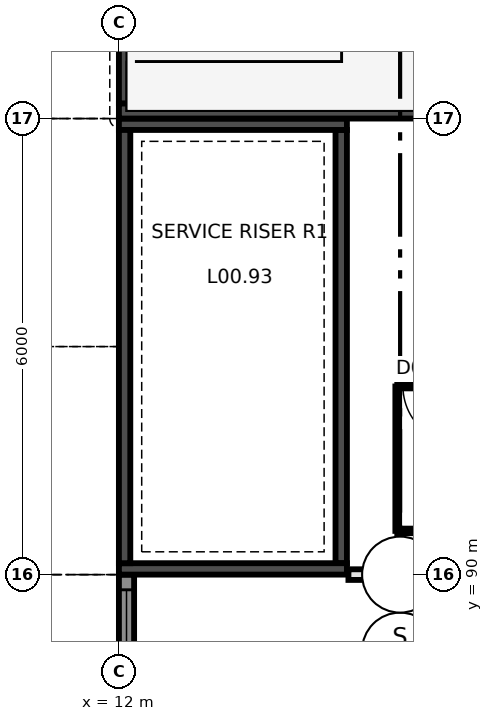
"""IFC4 building model, lengths in metres.
Left out: names, types, materials, properties, quantities, classifications, styles, units other than length and angle.
Written with IfcOpenShell. Run it as: python <this file> out.ifc"""

import sys

from ifc_helpers import new_model, si_unit, direction, frame, frame_2d, origin, place, context, subcontext, project, spatial, rectangle, extrude, element, fill, save


model = new_model("IFC4")
c1 = context("Model", 3, precision=1e-05, world=origin(), true_north=direction((0.0, 1.0)))
c2 = subcontext(c1, "Body", "Model", "MODEL_VIEW")
j1 = project(units=[si_unit("LENGTHUNIT", "METRE"), si_unit("PLANEANGLEUNIT", "RADIAN")], contexts=[c1])
p1 = place(None, origin())
s1 = spatial("IfcSite", under=j1, at=p1, CompositionType="ELEMENT")
p2 = place(p1, origin())
s2 = spatial("IfcBuilding", under=s1, at=p2, CompositionType="ELEMENT")
p3 = place(p2, origin())
s3 = spatial("IfcBuildingStorey", under=s2, at=p3, CompositionType="ELEMENT", Elevation=0.0)
p4 = place(p3, frame((12.0, 96.1, -0.3), z_axis=(0.0, 0.0, 1.0), x_axis=(1.0, 0.0, 0.0)))
e1 = element("IfcWall", 1, at=p4, inside=s3, PredefinedType="SHEAR", context=c2, shape_type="SweptSolid", body=[
    extrude(rectangle(XDim=6.0, YDim=0.2, at=frame_2d((3.0, 0.0))), origin(), (0.0, 0.0, 1.0), 7.3),
])
p5 = place(p3, frame((12.1, 96.2, -0.3), z_axis=(0.0, 0.0, 1.0), x_axis=(0.0, 1.0, 0.0)))
e2 = element("IfcWall", 2, at=p5, inside=s3, PredefinedType="SHEAR", context=c2, shape_type="SweptSolid", body=[
    extrude(rectangle(XDim=5.6, YDim=0.2, at=frame_2d((2.8, 0.0))), origin(), (0.0, 0.0, 1.0), 7.3),
])
p6 = place(p5, frame((3.675, 0.0, 0.3)))
e3 = element("IfcOpeningElement", 3, at=p6, cuts=e2, PredefinedType="OPENING", context=c2, shape_type="SweptSolid", body=[
    extrude(rectangle(XDim=1.8, YDim=2.4, at=frame_2d((0.9, 1.2))), frame((0.0, 0.11, 0.0), z_axis=(0.0, -1.0, 0.0), x_axis=(1.0, 0.0, 0.0)), (0.0, 0.0, 1.0), 0.22),
])
for number, where, z_axis, x_axis in (
    (4, (12.0, 95.925, -0.3), (0.0, 0.0, 1.0), (1.0, 0.0, 0.0)),
    (5, (12.0, 90.075, -0.3), (0.0, 0.0, 1.0), (1.0, 0.0, 0.0)),
):
    element("IfcWall", number, at=place(p3, frame(where, z_axis=z_axis, x_axis=x_axis)), inside=s3, PredefinedType="SHEAR", context=c2, shape_type="SweptSolid", body=[
        extrude(rectangle(XDim=3.0, YDim=0.15, at=frame_2d((1.5, 0.0))), origin(), (0.0, 0.0, 1.0), 7.3),
    ])
for number, where, z_axis, x_axis in (
    (6, (12.075, 90.15, -0.3), (0.0, 0.0, 1.0), (0.0, 1.0, 0.0)),
    (7, (14.925, 90.15, -0.3), (0.0, 0.0, 1.0), (0.0, 1.0, 0.0)),
):
    element("IfcWall", number, at=place(p3, frame(where, z_axis=z_axis, x_axis=x_axis)), inside=s3, PredefinedType="SHEAR", context=c2, shape_type="SweptSolid", body=[
        extrude(rectangle(XDim=5.7, YDim=0.15, at=frame_2d((2.85, 0.0))), origin(), (0.0, 0.0, 1.0), 7.3),
    ])
p7 = place(p3, frame((12.1, 84.0, 0.0), z_axis=(0.0, 0.0, 1.0), x_axis=(0.0, 1.0, 0.0)))
e8 = element("IfcWall", 8, at=p7, inside=s3, PredefinedType="SOLIDWALL", context=c2, shape_type="SweptSolid", body=[
    extrude(rectangle(XDim=6.0, YDim=0.2, at=frame_2d((3.0, 0.0))), origin(), (0.0, 0.0, 1.0), 6.05),
])
p8 = place(p7, frame((2.42, 0.0, 0.0)))
e9 = element("IfcOpeningElement", 9, at=p8, cuts=e8, PredefinedType="OPENING", context=c2, shape_type="SweptSolid", body=[
    extrude(rectangle(XDim=1.1, YDim=2.4, at=frame_2d((0.55, 1.2))), frame((0.0, 0.11, 0.0), z_axis=(0.0, -1.0, 0.0), x_axis=(1.0, 0.0, 0.0)), (0.0, 0.0, 1.0), 0.22),
])
p9 = place(p7, frame((2.42, 0.0, 2.5)))
e10 = element("IfcOpeningElement", 10, at=p9, cuts=e8, PredefinedType="OPENING", context=c2, shape_type="SweptSolid", body=[
    extrude(rectangle(XDim=1.1, YDim=3.2, at=frame_2d((0.55, 1.6))), frame((0.0, 0.11, 0.0), z_axis=(0.0, -1.0, 0.0), x_axis=(1.0, 0.0, 0.0)), (0.0, 0.0, 1.0), 0.22),
])
p10 = place(p7, frame((0.2, 0.0, 0.1)))
e11 = element("IfcOpeningElement", 11, at=p10, cuts=e8, PredefinedType="OPENING", context=c2, shape_type="SweptSolid", body=[
    extrude(rectangle(XDim=2.22, YDim=5.6, at=frame_2d((1.11, 2.8))), frame((0.0, 0.11, 0.0), z_axis=(0.0, -1.0, 0.0), x_axis=(1.0, 0.0, 0.0)), (0.0, 0.0, 1.0), 0.22),
])
p11 = place(p7, frame((3.52, 0.0, 0.1)))
e12 = element("IfcOpeningElement", 12, at=p11, cuts=e8, PredefinedType="OPENING", context=c2, shape_type="SweptSolid", body=[
    extrude(rectangle(XDim=2.28, YDim=5.6, at=frame_2d((1.14, 2.8))), frame((0.0, 0.11, 0.0), z_axis=(0.0, -1.0, 0.0), x_axis=(1.0, 0.0, 0.0)), (0.0, 0.0, 1.0), 0.22),
])
p12 = place(p3, frame((15.02, 90.0, 0.0), z_axis=(0.0, 0.0, 1.0), x_axis=(1.0, 0.0, 0.0)))
e13 = element("IfcWall", 13, at=p12, inside=s3, PredefinedType="PARTITIONING", context=c2, shape_type="SweptSolid", body=[
    extrude(rectangle(XDim=2.96, YDim=0.14, at=frame_2d((1.48, 0.0))), origin(), (0.0, 0.0, 1.0), 5.5),
])
p13 = place(p3, frame((15.663, 90.575, 0.0), z_axis=(0.0, 0.0, 1.0), x_axis=(1.0, 0.0, 0.0)))
e14 = element("IfcWall", 14, at=p13, inside=s3, PredefinedType="PARTITIONING", context=c2, shape_type="SweptSolid", body=[
    extrude(rectangle(XDim=10.0, YDim=0.06, at=frame_2d((5.0, 0.0))), origin(), (0.0, 0.0, 1.0), 2.1),
])
p14 = place(p3, frame((15.663, 90.575, 0.0), z_axis=(0.0, 0.0, 1.0), x_axis=(0.0, 1.0, 0.0)))
e15 = element("IfcWall", 15, at=p14, inside=s3, PredefinedType="PARTITIONING", context=c2, shape_type="SweptSolid", body=[
    extrude(rectangle(XDim=1.9, YDim=0.05, at=frame_2d((0.95, 0.0))), origin(), (0.0, 0.0, 1.0), 2.1),
])
p15 = place(p3, frame((15.663, 92.475, 0.0), z_axis=(0.0, 0.0, 1.0), x_axis=(1.0, 0.0, 0.0)))
e16 = element("IfcWall", 16, at=p15, inside=s3, PredefinedType="PARTITIONING", context=c2, shape_type="SweptSolid", body=[
    extrude(rectangle(XDim=0.9, YDim=0.05, at=frame_2d((0.45, 0.0))), origin(), (0.0, 0.0, 1.0), 2.1),
])
p16 = place(p15, frame((0.075, 0.0, 0.0)))
e17 = element("IfcOpeningElement", 17, at=p16, cuts=e16, PredefinedType="OPENING", context=c2, shape_type="SweptSolid", body=[
    extrude(rectangle(XDim=0.75, YDim=2.0, at=frame_2d((0.375, 1.0))), frame((0.0, 0.035, 0.0), z_axis=(0.0, -1.0, 0.0), x_axis=(1.0, 0.0, 0.0)), (0.0, 0.0, 1.0), 0.07),
])
p17 = place(p11, origin())
e18 = element("IfcWindow", 18, at=p17, inside=s3, PartitioningType="SINGLE_PANEL", PredefinedType="WINDOW", context=c2, shape_type="SweptSolid", body=[
    extrude(rectangle(XDim=2.28, YDim=5.6, at=frame_2d((1.14, 2.8))), frame((0.0, 0.03, 0.0), z_axis=(0.0, -1.0, 0.0), x_axis=(1.0, 0.0, 0.0)), (0.0, 0.0, 1.0), 0.06),
])
fill(e12, e18)
p18 = place(p16, frame((0.75, 0.0, 0.0), z_axis=(0.0, 0.0, 1.0), x_axis=(-1.0, 0.0, 0.0)))
e19 = element("IfcDoor", 19, at=p18, inside=s3, OperationType="SINGLE_SWING_RIGHT", PredefinedType="DOOR", context=c2, shape_type="SweptSolid", body=[
    extrude(rectangle(XDim=0.75, YDim=2.0, at=frame_2d((0.375, 1.0))), frame((0.0, 0.025, 0.0), z_axis=(0.0, -1.0, 0.0), x_axis=(1.0, 0.0, 0.0)), (0.0, 0.0, 1.0), 0.05),
])
fill(e17, e19)
save(model, sys.argv[1])
